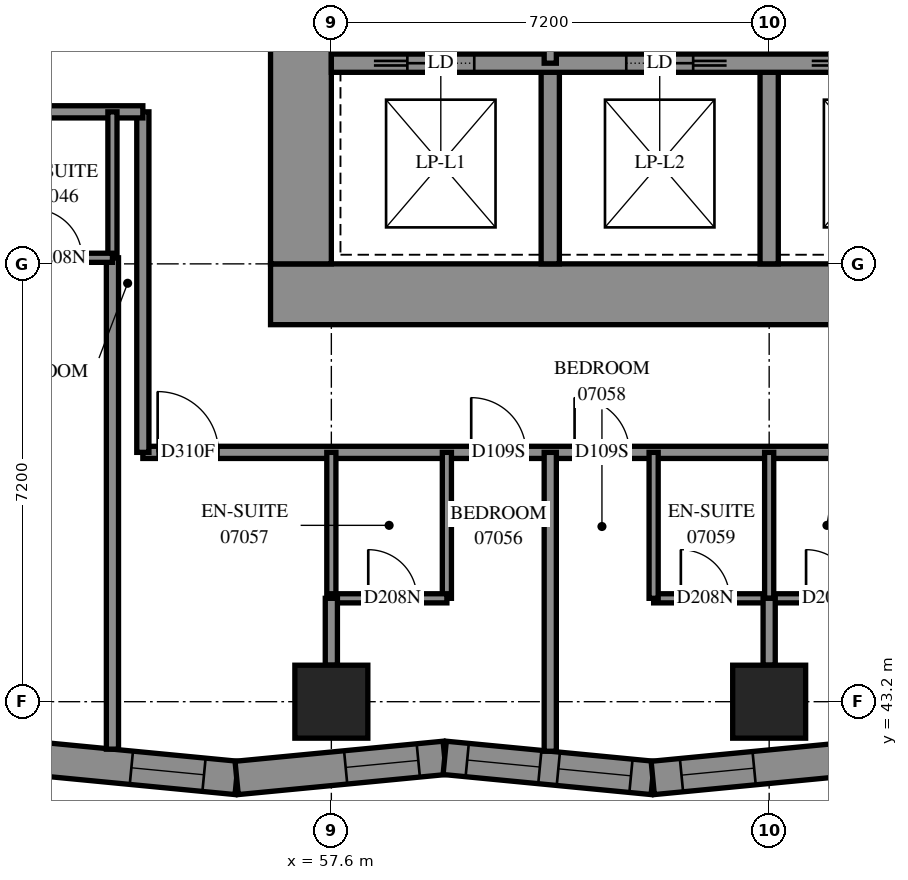
"""IFC4 building model, lengths in metres.
Left out: names, types, materials, properties, quantities, classifications, styles, units other than length and angle.
Written with IfcOpenShell. Run it as: python <this file> out.ifc"""

import sys

from ifc_helpers import new_model, si_unit, direction, frame, frame_2d, origin, origin_2d, place, context, subcontext, project, spatial, polyline, rectangle, outline, extrude, element, fill, save


model = new_model("IFC4")
c1 = context("Model", 3, precision=1e-05, world=origin(), true_north=direction((0.0, 1.0)))
c2 = subcontext(c1, "Body", "Model", "MODEL_VIEW")
j1 = project(units=[si_unit("LENGTHUNIT", "METRE"), si_unit("PLANEANGLEUNIT", "RADIAN")], contexts=[c1])
p1 = place(None, origin())
s1 = spatial("IfcSite", under=j1, at=p1, CompositionType="ELEMENT")
p2 = place(p1, origin())
s2 = spatial("IfcBuilding", under=s1, at=p2, CompositionType="ELEMENT")
p3 = place(p2, frame((0.0, 0.0, 30.4)))
s3 = spatial("IfcBuildingStorey", under=s2, at=p3, CompositionType="ELEMENT", Elevation=30.4)
for number, where, z_axis, x_axis in (
    (1, (57.6, 43.2, 0.0), (0.0, 0.0, 1.0), (1.0, 0.0, 0.0)),
    (2, (64.8, 43.2, 0.0), (0.0, 0.0, 1.0), (1.0, 0.0, 0.0)),
):
    element("IfcColumn", number, at=place(p3, frame(where, z_axis=z_axis, x_axis=x_axis)), inside=s3, PredefinedType="COLUMN", context=c2, shape_type="SweptSolid", body=[
        extrude(rectangle(XDim=1.2, YDim=1.2, at=origin_2d()), origin(), (0.0, 0.0, 1.0), 3.1),
    ])
p4 = place(p3, frame((56.6, 49.9, -0.3), z_axis=(0.0, 0.0, 1.0), x_axis=(1.0, 0.0, 0.0)))
e3 = element("IfcWall", 3, at=p4, inside=s3, PredefinedType="SHEAR", context=c2, shape_type="SweptSolid", body=[
    extrude(rectangle(XDim=16.4, YDim=1.0, at=frame_2d((8.2, 0.0))), origin(), (0.0, 0.0, 1.0), 2.7),
])
p5 = place(p3, frame((57.1, 50.4, -0.3), z_axis=(0.0, 0.0, 1.0), x_axis=(0.0, 1.0, 0.0)))
e4 = element("IfcWall", 4, at=p5, inside=s3, PredefinedType="SHEAR", context=c2, shape_type="SweptSolid", body=[
    extrude(rectangle(XDim=14.4, YDim=1.0, at=frame_2d((7.2, 0.0))), origin(), (0.0, 0.0, 1.0), 2.7),
])
p6 = place(p5, frame((4.55, 0.0, 0.3)))
e5 = element("IfcOpeningElement", 5, at=p6, cuts=e4, PredefinedType="OPENING", context=c2, shape_type="SweptSolid", body=[
    extrude(rectangle(XDim=1.1, YDim=2.1, at=frame_2d((0.55, 1.05))), frame((0.0, 0.51, 0.0), z_axis=(0.0, -1.0, 0.0), x_axis=(1.0, 0.0, 0.0)), (0.0, 0.0, 1.0), 1.02),
])
p7 = place(p5, frame((11.35, 0.0, 0.3)))
e6 = element("IfcOpeningElement", 6, at=p7, cuts=e4, PredefinedType="OPENING", context=c2, shape_type="SweptSolid", body=[
    extrude(rectangle(XDim=1.1, YDim=2.1, at=frame_2d((0.55, 1.05))), frame((0.0, 0.51, 0.0), z_axis=(0.0, -1.0, 0.0), x_axis=(1.0, 0.0, 0.0)), (0.0, 0.0, 1.0), 1.02),
])
for number, where, z_axis, x_axis in (
    (7, (61.2, 50.4, 0.0), (0.0, 0.0, 1.0), (0.0, 1.0, 0.0)),
    (8, (64.8, 50.4, 0.0), (0.0, 0.0, 1.0), (0.0, 1.0, 0.0)),
):
    element("IfcWall", number, at=place(p3, frame(where, z_axis=z_axis, x_axis=x_axis)), inside=s3, PredefinedType="SOLIDWALL", context=c2, shape_type="SweptSolid", body=[
        extrude(rectangle(XDim=3.3, YDim=0.3, at=frame_2d((1.65, 0.0))), origin(), (0.0, 0.0, 1.0), 3.1),
    ])
p8 = place(p3, frame((57.6, 53.7, 0.0), z_axis=(0.0, 0.0, 1.0), x_axis=(1.0, 0.0, 0.0)))
e9 = element("IfcWall", 9, at=p8, inside=s3, PredefinedType="SOLIDWALL", context=c2, shape_type="SweptSolid", body=[
    extrude(rectangle(XDim=14.4, YDim=0.3, at=frame_2d((7.2, 0.0))), origin(), (0.0, 0.0, 1.0), 3.1),
])
p9 = place(p8, frame((1.25, 0.0, 0.0)))
e10 = element("IfcOpeningElement", 10, at=p9, cuts=e9, PredefinedType="OPENING", context=c2, shape_type="SweptSolid", body=[
    extrude(rectangle(XDim=1.1, YDim=2.1, at=frame_2d((0.55, 1.05))), frame((0.0, 0.16, 0.0), z_axis=(0.0, -1.0, 0.0), x_axis=(1.0, 0.0, 0.0)), (0.0, 0.0, 1.0), 0.32),
])
p10 = place(p8, frame((4.85, 0.0, 0.0)))
e11 = element("IfcOpeningElement", 11, at=p10, cuts=e9, PredefinedType="OPENING", context=c2, shape_type="SweptSolid", body=[
    extrude(rectangle(XDim=1.1, YDim=2.1, at=frame_2d((0.55, 1.05))), frame((0.0, 0.16, 0.0), z_axis=(0.0, -1.0, 0.0), x_axis=(1.0, 0.0, 0.0)), (0.0, 0.0, 1.0), 0.32),
])
p11 = place(p8, frame((8.45, 0.0, 0.0)))
e12 = element("IfcOpeningElement", 12, at=p11, cuts=e9, PredefinedType="OPENING", context=c2, shape_type="SweptSolid", body=[
    extrude(rectangle(XDim=1.1, YDim=2.1, at=frame_2d((0.55, 1.05))), frame((0.0, 0.16, 0.0), z_axis=(0.0, -1.0, 0.0), x_axis=(1.0, 0.0, 0.0)), (0.0, 0.0, 1.0), 0.32),
])
p12 = place(p8, frame((12.05, 0.0, 0.0)))
e13 = element("IfcOpeningElement", 13, at=p12, cuts=e9, PredefinedType="OPENING", context=c2, shape_type="SweptSolid", body=[
    extrude(rectangle(XDim=1.1, YDim=2.1, at=frame_2d((0.55, 1.05))), frame((0.0, 0.16, 0.0), z_axis=(0.0, -1.0, 0.0), x_axis=(1.0, 0.0, 0.0)), (0.0, 0.0, 1.0), 0.32),
])
p13 = place(p3, frame((52.598, 42.279, 0.0), z_axis=(0.0, 0.0, 1.0), x_axis=(0.9953800797, -0.0960130045, 0.0)))
e14 = element("IfcWall", 14, at=p13, inside=s3, PredefinedType="SOLIDWALL", context=c2, shape_type="SweptSolid", body=[
    extrude(outline(polyline([(0.05, -0.275), (3.487, -0.275), (3.434, 0.275), (-0.05, 0.275), (0.05, -0.275)])), origin(), (0.0, 0.0, 1.0), 3.1),
])
p14 = place(p13, frame((1.722, 0.0, 0.5)))
e15 = element("IfcOpeningElement", 15, at=p14, cuts=e14, PredefinedType="OPENING", context=c2, shape_type="SweptSolid", body=[
    extrude(rectangle(XDim=1.2, YDim=2.45, at=frame_2d((0.6, 1.225))), frame((0.0, 0.285, 0.0), z_axis=(0.0, -1.0, 0.0), x_axis=(1.0, 0.0, 0.0)), (0.0, 0.0, 1.0), 0.57),
])
p15 = place(p3, frame((56.043, 41.946, 0.0), z_axis=(0.0, 0.0, 1.0), x_axis=(0.995380467, 0.096008989, 0.0)))
e16 = element("IfcWall", 16, at=p15, inside=s3, PredefinedType="SOLIDWALL", context=c2, shape_type="SweptSolid", body=[
    extrude(outline(polyline([(-0.026, -0.275), (3.411, -0.275), (3.464, 0.275), (0.026, 0.275), (-0.026, -0.275)])), origin(), (0.0, 0.0, 1.0), 3.1),
])
p16 = place(p15, frame((1.801, 0.0, 0.5)))
e17 = element("IfcOpeningElement", 17, at=p16, cuts=e16, PredefinedType="OPENING", context=c2, shape_type="SweptSolid", body=[
    extrude(rectangle(XDim=1.2, YDim=2.45, at=frame_2d((0.6, 1.225))), frame((0.0, 0.285, 0.0), z_axis=(0.0, -1.0, 0.0), x_axis=(1.0, 0.0, 0.0)), (0.0, 0.0, 1.0), 0.57),
])
p17 = place(p3, frame((59.464, 42.276, 0.0), z_axis=(0.0, 0.0, 1.0), x_axis=(0.995380467, -0.096008989, 0.0)))
e18 = element("IfcWall", 18, at=p17, inside=s3, PredefinedType="SOLIDWALL", context=c2, shape_type="SweptSolid", body=[
    extrude(outline(polyline([(0.026, -0.275), (3.464, -0.275), (3.411, 0.275), (-0.026, 0.275), (0.026, -0.275)])), origin(), (0.0, 0.0, 1.0), 3.1),
])
p18 = place(p17, frame((0.372, 0.0, 0.5)))
e19 = element("IfcOpeningElement", 19, at=p18, cuts=e18, PredefinedType="OPENING", context=c2, shape_type="SweptSolid", body=[
    extrude(rectangle(XDim=1.2, YDim=2.45, at=frame_2d((0.6, 1.225))), frame((0.0, 0.285, 0.0), z_axis=(0.0, -1.0, 0.0), x_axis=(1.0, 0.0, 0.0)), (0.0, 0.0, 1.0), 0.57),
])
p19 = place(p17, frame((1.877, 0.0, 0.5)))
e20 = element("IfcOpeningElement", 20, at=p19, cuts=e18, PredefinedType="OPENING", context=c2, shape_type="SweptSolid", body=[
    extrude(rectangle(XDim=1.2, YDim=2.45, at=frame_2d((0.6, 1.225))), frame((0.0, 0.285, 0.0), z_axis=(0.0, -1.0, 0.0), x_axis=(1.0, 0.0, 0.0)), (0.0, 0.0, 1.0), 0.57),
])
p20 = place(p3, frame((62.885, 41.946, 0.0), z_axis=(0.0, 0.0, 1.0), x_axis=(0.9953807351, 0.0960062087, 0.0)))
e21 = element("IfcWall", 21, at=p20, inside=s3, PredefinedType="SOLIDWALL", context=c2, shape_type="SweptSolid", body=[
    extrude(outline(polyline([(-0.026, -0.275), (3.411, -0.275), (3.464, 0.275), (0.026, 0.275), (-0.026, -0.275)])), origin(), (0.0, 0.0, 1.0), 3.1),
])
p21 = place(p20, frame((0.475, 0.0, 0.5)))
e22 = element("IfcOpeningElement", 22, at=p21, cuts=e21, PredefinedType="OPENING", context=c2, shape_type="SweptSolid", body=[
    extrude(rectangle(XDim=1.2, YDim=2.45, at=frame_2d((0.6, 1.225))), frame((0.0, 0.285, 0.0), z_axis=(0.0, -1.0, 0.0), x_axis=(1.0, 0.0, 0.0)), (0.0, 0.0, 1.0), 0.57),
])
p22 = place(p3, frame((61.2, 53.7, 0.0), z_axis=(0.0, 0.0, 1.0), x_axis=(0.0, 1.0, 0.0)))
e23 = element("IfcWall", 23, at=p22, inside=s3, PredefinedType="PARTITIONING", context=c2, shape_type="SweptSolid", body=[
    extrude(rectangle(XDim=3.6, YDim=0.2, at=frame_2d((1.8, 0.0))), origin(), (0.0, 0.0, 1.0), 3.1),
])
p23 = place(p3, frame((54.5, 47.3, 0.0), z_axis=(0.0, 0.0, 1.0), x_axis=(1.0, 0.0, 0.0)))
e24 = element("IfcWall", 24, at=p23, inside=s3, PredefinedType="PARTITIONING", context=c2, shape_type="SweptSolid", body=[
    extrude(rectangle(XDim=19.56, YDim=0.2, at=frame_2d((9.78, 0.0))), origin(), (0.0, 0.0, 1.0), 3.1),
])
p24 = place(p23, frame((0.243, 0.0, 0.0)))
e25 = element("IfcOpeningElement", 25, at=p24, cuts=e24, PredefinedType="OPENING", context=c2, shape_type="SweptSolid", body=[
    extrude(rectangle(XDim=1.0, YDim=2.1, at=frame_2d((0.5, 1.05))), frame((0.0, 0.11, 0.0), z_axis=(0.0, -1.0, 0.0), x_axis=(1.0, 0.0, 0.0)), (0.0, 0.0, 1.0), 0.22),
])
p25 = place(p23, frame((5.4, 0.0, 0.0)))
e26 = element("IfcOpeningElement", 26, at=p25, cuts=e24, PredefinedType="OPENING", context=c2, shape_type="SweptSolid", body=[
    extrude(rectangle(XDim=0.9, YDim=2.1, at=frame_2d((0.45, 1.05))), frame((0.0, 0.11, 0.0), z_axis=(0.0, -1.0, 0.0), x_axis=(1.0, 0.0, 0.0)), (0.0, 0.0, 1.0), 0.22),
])
p26 = place(p23, frame((7.1, 0.0, 0.0)))
e27 = element("IfcOpeningElement", 27, at=p26, cuts=e24, PredefinedType="OPENING", context=c2, shape_type="SweptSolid", body=[
    extrude(rectangle(XDim=0.9, YDim=2.1, at=frame_2d((0.45, 1.05))), frame((0.0, 0.11, 0.0), z_axis=(0.0, -1.0, 0.0), x_axis=(1.0, 0.0, 0.0)), (0.0, 0.0, 1.0), 0.22),
])
p27 = place(p23, frame((12.6, 0.0, 0.0)))
e28 = element("IfcOpeningElement", 28, at=p27, cuts=e24, PredefinedType="OPENING", context=c2, shape_type="SweptSolid", body=[
    extrude(rectangle(XDim=0.9, YDim=2.1, at=frame_2d((0.45, 1.05))), frame((0.0, 0.11, 0.0), z_axis=(0.0, -1.0, 0.0), x_axis=(1.0, 0.0, 0.0)), (0.0, 0.0, 1.0), 0.22),
])
p28 = place(p23, frame((14.3, 0.0, 0.0)))
e29 = element("IfcOpeningElement", 29, at=p28, cuts=e24, PredefinedType="OPENING", context=c2, shape_type="SweptSolid", body=[
    extrude(rectangle(XDim=0.9, YDim=2.1, at=frame_2d((0.45, 1.05))), frame((0.0, 0.11, 0.0), z_axis=(0.0, -1.0, 0.0), x_axis=(1.0, 0.0, 0.0)), (0.0, 0.0, 1.0), 0.22),
])
p29 = place(p3, frame((54.0, 42.42, 0.0), z_axis=(0.0, 0.0, 1.0), x_axis=(0.0, 1.0, 0.0)))
e30 = element("IfcWall", 30, at=p29, inside=s3, PredefinedType="PARTITIONING", context=c2, shape_type="SweptSolid", body=[
    extrude(rectangle(XDim=8.08, YDim=0.2, at=frame_2d((4.04, 0.0))), origin(), (0.0, 0.0, 1.0), 3.1),
])
p30 = place(p3, frame((54.5, 47.3, 0.0), z_axis=(0.0, 0.0, 1.0), x_axis=(0.0, 1.0, 0.0)))
e31 = element("IfcWall", 31, at=p30, inside=s3, PredefinedType="PARTITIONING", context=c2, shape_type="SweptSolid", body=[
    extrude(rectangle(XDim=5.6, YDim=0.2, at=frame_2d((2.8, 0.0))), origin(), (0.0, 0.0, 1.0), 3.1),
])
p31 = place(p3, frame((61.2, 42.385, 0.0), z_axis=(0.0, 0.0, 1.0), x_axis=(0.0, 1.0, 0.0)))
e32 = element("IfcWall", 32, at=p31, inside=s3, PredefinedType="PARTITIONING", context=c2, shape_type="SweptSolid", body=[
    extrude(rectangle(XDim=4.915, YDim=0.2, at=frame_2d((2.458, 0.0))), origin(), (0.0, 0.0, 1.0), 3.1),
])
p32 = place(p3, frame((50.4, 52.9, 0.0), z_axis=(0.0, 0.0, 1.0), x_axis=(1.0, 0.0, 0.0)))
e33 = element("IfcWall", 33, at=p32, inside=s3, PredefinedType="PARTITIONING", context=c2, shape_type="SweptSolid", body=[
    extrude(rectangle(XDim=4.1, YDim=0.2, at=frame_2d((2.05, 0.0))), origin(), (0.0, 0.0, 1.0), 3.1),
])
p33 = place(p32, frame((0.4, 0.0, 0.0)))
e34 = element("IfcOpeningElement", 34, at=p33, cuts=e33, PredefinedType="OPENING", context=c2, shape_type="SweptSolid", body=[
    extrude(rectangle(XDim=0.9, YDim=2.1, at=frame_2d((0.45, 1.05))), frame((0.0, 0.11, 0.0), z_axis=(0.0, -1.0, 0.0), x_axis=(1.0, 0.0, 0.0)), (0.0, 0.0, 1.0), 0.22),
])
p34 = place(p3, frame((62.9, 44.9, 0.0), z_axis=(0.0, 0.0, 1.0), x_axis=(1.0, 0.0, 0.0)))
e35 = element("IfcWall", 35, at=p34, inside=s3, PredefinedType="PARTITIONING", context=c2, shape_type="SweptSolid", body=[
    extrude(rectangle(XDim=3.8, YDim=0.15, at=frame_2d((1.9, 0.0))), origin(), (0.0, 0.0, 1.0), 3.1),
])
p35 = place(p34, frame((0.448, 0.0, 0.0)))
e36 = element("IfcOpeningElement", 36, at=p35, cuts=e35, PredefinedType="OPENING", context=c2, shape_type="SweptSolid", body=[
    extrude(rectangle(XDim=0.8, YDim=2.1, at=frame_2d((0.4, 1.05))), frame((0.0, 0.085, 0.0), z_axis=(0.0, -1.0, 0.0), x_axis=(1.0, 0.0, 0.0)), (0.0, 0.0, 1.0), 0.17),
])
p36 = place(p34, frame((2.507, 0.0, 0.0)))
e37 = element("IfcOpeningElement", 37, at=p36, cuts=e35, PredefinedType="OPENING", context=c2, shape_type="SweptSolid", body=[
    extrude(rectangle(XDim=0.8, YDim=2.1, at=frame_2d((0.4, 1.05))), frame((0.0, 0.085, 0.0), z_axis=(0.0, -1.0, 0.0), x_axis=(1.0, 0.0, 0.0)), (0.0, 0.0, 1.0), 0.17),
])
for number, where, z_axis, x_axis in (
    (38, (54.0, 50.5, 0.0), (0.0, 0.0, 1.0), (0.0, 1.0, 0.0)),
    (39, (59.5, 44.9, 0.0), (0.0, 0.0, 1.0), (0.0, 1.0, 0.0)),
    (40, (57.6, 44.9, 0.0), (0.0, 0.0, 1.0), (0.0, 1.0, 0.0)),
    (41, (62.9, 44.9, 0.0), (0.0, 0.0, 1.0), (0.0, 1.0, 0.0)),
    (42, (64.8, 44.9, 0.0), (0.0, 0.0, 1.0), (0.0, 1.0, 0.0)),
):
    element("IfcWall", number, at=place(p3, frame(where, z_axis=z_axis, x_axis=x_axis)), inside=s3, PredefinedType="PARTITIONING", context=c2, shape_type="SweptSolid", body=[
        extrude(rectangle(XDim=2.4, YDim=0.15, at=frame_2d((1.2, 0.0))), origin(), (0.0, 0.0, 1.0), 3.1),
    ])
p37 = place(p3, frame((52.1, 50.5, 0.0), z_axis=(0.0, 0.0, 1.0), x_axis=(1.0, 0.0, 0.0)))
e43 = element("IfcWall", 43, at=p37, inside=s3, PredefinedType="PARTITIONING", context=c2, shape_type="SweptSolid", body=[
    extrude(rectangle(XDim=1.9, YDim=0.15, at=frame_2d((0.95, 0.0))), origin(), (0.0, 0.0, 1.0), 3.1),
])
p38 = place(p37, frame((0.598, 0.0, 0.0)))
e44 = element("IfcOpeningElement", 44, at=p38, cuts=e43, PredefinedType="OPENING", context=c2, shape_type="SweptSolid", body=[
    extrude(rectangle(XDim=0.8, YDim=2.1, at=frame_2d((0.4, 1.05))), frame((0.0, 0.085, 0.0), z_axis=(0.0, -1.0, 0.0), x_axis=(1.0, 0.0, 0.0)), (0.0, 0.0, 1.0), 0.17),
])
p39 = place(p3, frame((57.6, 44.9, 0.0), z_axis=(0.0, 0.0, 1.0), x_axis=(1.0, 0.0, 0.0)))
e45 = element("IfcWall", 45, at=p39, inside=s3, PredefinedType="PARTITIONING", context=c2, shape_type="SweptSolid", body=[
    extrude(rectangle(XDim=1.9, YDim=0.15, at=frame_2d((0.95, 0.0))), origin(), (0.0, 0.0, 1.0), 3.1),
])
p40 = place(p39, frame((0.607, 0.0, 0.0)))
e46 = element("IfcOpeningElement", 46, at=p40, cuts=e45, PredefinedType="OPENING", context=c2, shape_type="SweptSolid", body=[
    extrude(rectangle(XDim=0.8, YDim=2.1, at=frame_2d((0.4, 1.05))), frame((0.0, 0.085, 0.0), z_axis=(0.0, -1.0, 0.0), x_axis=(1.0, 0.0, 0.0)), (0.0, 0.0, 1.0), 0.17),
])
for number, where, z_axis, x_axis in (
    (47, (57.6, 43.8, 0.0), (0.0, 0.0, 1.0), (0.0, 1.0, 0.0)),
    (48, (64.8, 43.8, 0.0), (0.0, 0.0, 1.0), (0.0, 1.0, 0.0)),
):
    element("IfcWall", number, at=place(p3, frame(where, z_axis=z_axis, x_axis=x_axis)), inside=s3, PredefinedType="PARTITIONING", context=c2, shape_type="SweptSolid", body=[
        extrude(rectangle(XDim=1.1, YDim=0.2, at=frame_2d((0.55, 0.0))), origin(), (0.0, 0.0, 1.0), 3.1),
    ])
p41 = place(p14, origin())
e49 = element("IfcWindow", 49, at=p41, inside=s3, PartitioningType="SINGLE_PANEL", PredefinedType="WINDOW", context=c2, shape_type="SweptSolid", body=[
    extrude(rectangle(XDim=1.2, YDim=2.45, at=frame_2d((0.6, 1.225))), frame((0.0, 0.155, 0.0), z_axis=(0.0, -1.0, 0.0), x_axis=(1.0, 0.0, 0.0)), (0.0, 0.0, 1.0), 0.06),
])
fill(e15, e49)
p42 = place(p16, origin())
e50 = element("IfcWindow", 50, at=p42, inside=s3, PartitioningType="SINGLE_PANEL", PredefinedType="WINDOW", context=c2, shape_type="SweptSolid", body=[
    extrude(rectangle(XDim=1.2, YDim=2.45, at=frame_2d((0.6, 1.225))), frame((0.0, 0.155, 0.0), z_axis=(0.0, -1.0, 0.0), x_axis=(1.0, 0.0, 0.0)), (0.0, 0.0, 1.0), 0.06),
])
fill(e17, e50)
p43 = place(p18, origin())
e51 = element("IfcWindow", 51, at=p43, inside=s3, PartitioningType="SINGLE_PANEL", PredefinedType="WINDOW", context=c2, shape_type="SweptSolid", body=[
    extrude(rectangle(XDim=1.2, YDim=2.45, at=frame_2d((0.6, 1.225))), frame((0.0, 0.155, 0.0), z_axis=(0.0, -1.0, 0.0), x_axis=(1.0, 0.0, 0.0)), (0.0, 0.0, 1.0), 0.06),
])
fill(e19, e51)
p44 = place(p19, origin())
e52 = element("IfcWindow", 52, at=p44, inside=s3, PartitioningType="SINGLE_PANEL", PredefinedType="WINDOW", context=c2, shape_type="SweptSolid", body=[
    extrude(rectangle(XDim=1.2, YDim=2.45, at=frame_2d((0.6, 1.225))), frame((0.0, 0.155, 0.0), z_axis=(0.0, -1.0, 0.0), x_axis=(1.0, 0.0, 0.0)), (0.0, 0.0, 1.0), 0.06),
])
fill(e20, e52)
p45 = place(p21, origin())
e53 = element("IfcWindow", 53, at=p45, inside=s3, PartitioningType="SINGLE_PANEL", PredefinedType="WINDOW", context=c2, shape_type="SweptSolid", body=[
    extrude(rectangle(XDim=1.2, YDim=2.45, at=frame_2d((0.6, 1.225))), frame((0.0, 0.155, 0.0), z_axis=(0.0, -1.0, 0.0), x_axis=(1.0, 0.0, 0.0)), (0.0, 0.0, 1.0), 0.06),
])
fill(e22, e53)
p46 = place(p9, origin())
e54 = element("IfcDoor", 54, at=p46, inside=s3, OperationType="SLIDING_TO_LEFT", PredefinedType="DOOR", context=c2, shape_type="SweptSolid", body=[
    extrude(rectangle(XDim=1.1, YDim=2.1, at=frame_2d((0.55, 1.05))), frame((0.0, 0.025, 0.0), z_axis=(0.0, -1.0, 0.0), x_axis=(1.0, 0.0, 0.0)), (0.0, 0.0, 1.0), 0.05),
])
fill(e10, e54)
p47 = place(p10, origin())
e55 = element("IfcDoor", 55, at=p47, inside=s3, OperationType="SLIDING_TO_RIGHT", PredefinedType="DOOR", context=c2, shape_type="SweptSolid", body=[
    extrude(rectangle(XDim=1.1, YDim=2.1, at=frame_2d((0.55, 1.05))), frame((0.0, 0.025, 0.0), z_axis=(0.0, -1.0, 0.0), x_axis=(1.0, 0.0, 0.0)), (0.0, 0.0, 1.0), 0.05),
])
fill(e11, e55)
p48 = place(p38, origin())
e56 = element("IfcDoor", 56, at=p48, inside=s3, OperationType="SINGLE_SWING_RIGHT", PredefinedType="DOOR", context=c2, shape_type="SweptSolid", body=[
    extrude(rectangle(XDim=0.8, YDim=2.1, at=frame_2d((0.4, 1.05))), frame((0.0, 0.025, 0.0), z_axis=(0.0, -1.0, 0.0), x_axis=(1.0, 0.0, 0.0)), (0.0, 0.0, 1.0), 0.05),
])
fill(e44, e56)
p49 = place(p24, origin())
e57 = element("IfcDoor", 57, at=p49, inside=s3, OperationType="SINGLE_SWING_RIGHT", PredefinedType="DOOR", context=c2, shape_type="SweptSolid", body=[
    extrude(rectangle(XDim=1.0, YDim=2.1, at=frame_2d((0.5, 1.05))), frame((0.0, 0.025, 0.0), z_axis=(0.0, -1.0, 0.0), x_axis=(1.0, 0.0, 0.0)), (0.0, 0.0, 1.0), 0.05),
])
fill(e25, e57)
p50 = place(p25, origin())
e58 = element("IfcDoor", 58, at=p50, inside=s3, OperationType="SINGLE_SWING_LEFT", PredefinedType="DOOR", context=c2, shape_type="SweptSolid", body=[
    extrude(rectangle(XDim=0.9, YDim=2.1, at=frame_2d((0.45, 1.05))), frame((0.0, 0.025, 0.0), z_axis=(0.0, -1.0, 0.0), x_axis=(1.0, 0.0, 0.0)), (0.0, 0.0, 1.0), 0.05),
])
fill(e26, e58)
p51 = place(p40, origin())
e59 = element("IfcDoor", 59, at=p51, inside=s3, OperationType="SINGLE_SWING_RIGHT", PredefinedType="DOOR", context=c2, shape_type="SweptSolid", body=[
    extrude(rectangle(XDim=0.8, YDim=2.1, at=frame_2d((0.4, 1.05))), frame((0.0, 0.025, 0.0), z_axis=(0.0, -1.0, 0.0), x_axis=(1.0, 0.0, 0.0)), (0.0, 0.0, 1.0), 0.05),
])
fill(e46, e59)
p52 = place(p26, origin())
e60 = element("IfcDoor", 60, at=p52, inside=s3, OperationType="SINGLE_SWING_RIGHT", PredefinedType="DOOR", context=c2, shape_type="SweptSolid", body=[
    extrude(rectangle(XDim=0.9, YDim=2.1, at=frame_2d((0.45, 1.05))), frame((0.0, 0.025, 0.0), z_axis=(0.0, -1.0, 0.0), x_axis=(1.0, 0.0, 0.0)), (0.0, 0.0, 1.0), 0.05),
])
fill(e27, e60)
p53 = place(p35, origin())
e61 = element("IfcDoor", 61, at=p53, inside=s3, OperationType="SINGLE_SWING_RIGHT", PredefinedType="DOOR", context=c2, shape_type="SweptSolid", body=[
    extrude(rectangle(XDim=0.8, YDim=2.1, at=frame_2d((0.4, 1.05))), frame((0.0, 0.025, 0.0), z_axis=(0.0, -1.0, 0.0), x_axis=(1.0, 0.0, 0.0)), (0.0, 0.0, 1.0), 0.05),
])
fill(e36, e61)
p54 = place(p36, origin())
e62 = element("IfcDoor", 62, at=p54, inside=s3, OperationType="SINGLE_SWING_RIGHT", PredefinedType="DOOR", context=c2, shape_type="SweptSolid", body=[
    extrude(rectangle(XDim=0.8, YDim=2.1, at=frame_2d((0.4, 1.05))), frame((0.0, 0.025, 0.0), z_axis=(0.0, -1.0, 0.0), x_axis=(1.0, 0.0, 0.0)), (0.0, 0.0, 1.0), 0.05),
])
fill(e37, e62)
save(model, sys.argv[1])
